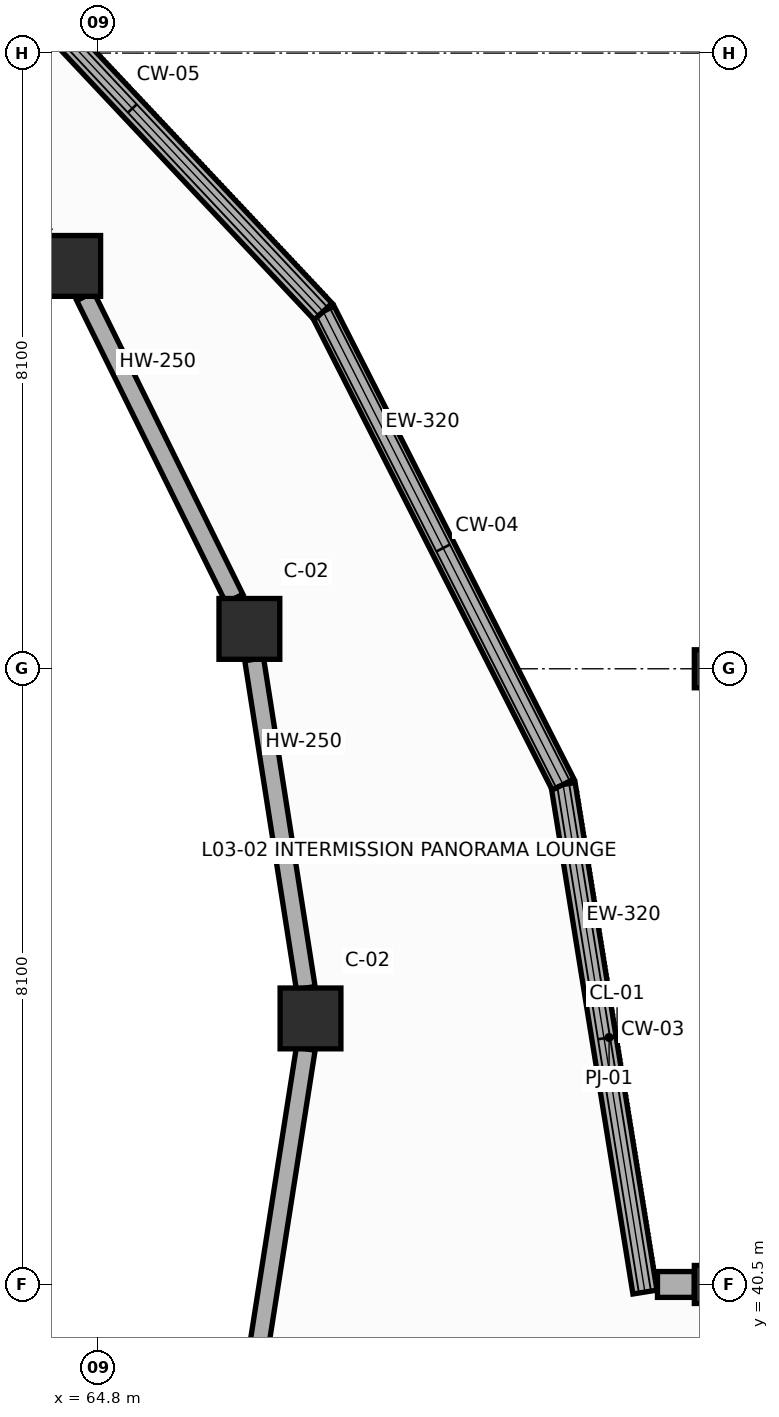
"""IFC4 building model, lengths in metres.
Left out: names, types, materials, properties, quantities, classifications, styles, units other than length and angle.
Written with IfcOpenShell. Run it as: python <this file> out.ifc"""

import sys

from ifc_helpers import new_model, si_unit, direction, frame, frame_2d, origin, origin_2d, place, context, subcontext, project, spatial, rectangle, extrude, element, save


model = new_model("IFC4")
c1 = context("Model", 3, precision=1e-05, world=origin(), true_north=direction((0.0, 1.0)))
c2 = subcontext(c1, "Body", "Model", "MODEL_VIEW")
j1 = project(units=[si_unit("LENGTHUNIT", "METRE"), si_unit("PLANEANGLEUNIT", "RADIAN")], contexts=[c1])
p1 = place(None, origin())
s1 = spatial("IfcSite", under=j1, at=p1, CompositionType="ELEMENT")
p2 = place(p1, origin())
s2 = spatial("IfcBuilding", under=s1, at=p2, CompositionType="ELEMENT")
p3 = place(p2, frame((0.0, 0.0, 15.0)))
s3 = spatial("IfcBuildingStorey", under=s2, at=p3, CompositionType="ELEMENT", Elevation=15.0)
for number, where, z_axis, x_axis in (
    (1, (67.6, 44.0, 0.0), (0.0, 0.0, 1.0), (1.0, 0.0, 0.0)),
    (2, (66.796, 49.125, 0.0), (0.0, 0.0, 1.0), (1.0, 0.0, 0.0)),
    (3, (64.438, 53.9, 0.0), (0.0, 0.0, 1.0), (1.0, 0.0, 0.0)),
):
    element("IfcColumn", number, at=place(p3, frame(where, z_axis=z_axis, x_axis=x_axis)), inside=s3, PredefinedType="COLUMN", context=c2, shape_type="SweptSolid", body=[
        extrude(rectangle(XDim=0.8, YDim=0.8, at=origin_2d()), origin(), (0.0, 0.0, 1.0), 4.2),
    ])
for number, where, z_axis, x_axis in (
    (4, (72.9, 40.5, 0.0), (0.0, 0.0, 1.0), (1.0, 0.0, 0.0)),
    (5, (72.9, 48.6, 0.0), (0.0, 0.0, 1.0), (1.0, 0.0, 0.0)),
):
    element("IfcColumn", number, at=place(p3, frame(where, z_axis=z_axis, x_axis=x_axis)), inside=s3, PredefinedType="COLUMN", context=c2, shape_type="SweptSolid", body=[
        extrude(rectangle(XDim=0.5, YDim=0.5, at=origin_2d()), origin(), (0.0, 0.0, 1.0), 4.2),
    ])
p4 = place(p3, frame((70.923, 47.077, 0.0), z_axis=(0.0, 0.0, 1.0), x_axis=(0.159181370366, -0.987249356206, 0.0)))
e6 = element("IfcWall", 6, at=p4, inside=s3, PredefinedType="SOLIDWALL", context=c2, shape_type="SweptSolid", body=[
    extrude(rectangle(XDim=6.764, YDim=0.32, at=frame_2d((3.382, 0.0))), origin(), (0.0, 0.0, 1.0), 1.2),
])
p5 = place(p3, frame((67.766, 53.3, 0.0), z_axis=(0.0, 0.0, 1.0), x_axis=(0.452440262938, -0.891794712068, 0.0)))
e7 = element("IfcWall", 7, at=p5, inside=s3, PredefinedType="SOLIDWALL", context=c2, shape_type="SweptSolid", body=[
    extrude(rectangle(XDim=6.978, YDim=0.32, at=frame_2d((3.489, 0.0))), origin(), (0.0, 0.0, 1.0), 1.2),
])
p6 = place(p3, frame((62.745, 58.643, 0.0), z_axis=(0.0, 0.0, 1.0), x_axis=(0.684842129235, -0.728691469708, 0.0)))
e8 = element("IfcWall", 8, at=p6, inside=s3, PredefinedType="SOLIDWALL", context=c2, shape_type="SweptSolid", body=[
    extrude(rectangle(XDim=7.333, YDim=0.32, at=frame_2d((3.667, 0.0))), origin(), (0.0, 0.0, 1.0), 1.2),
])
p7 = place(p3, frame((72.65, 40.5, 0.0), z_axis=(0.0, 0.0, 1.0), x_axis=(-1.0, 0.0, 0.0)))
e9 = element("IfcWall", 9, at=p7, inside=s3, PredefinedType="SOLIDWALL", context=c2, shape_type="SweptSolid", body=[
    extrude(rectangle(XDim=0.485, YDim=0.34, at=frame_2d((0.242, 0.0))), origin(), (0.0, 0.0, 1.0), 3.9),
])
p8 = place(p3, frame((66.859, 48.725, 0.0), z_axis=(0.0, 0.0, 1.0), x_axis=(0.154985912507, -0.987916680153, 0.0)))
e10 = element("IfcWall", 10, at=p8, inside=s3, PredefinedType="SOLIDWALL", context=c2, shape_type="SweptSolid", body=[
    extrude(rectangle(XDim=4.378, YDim=0.25, at=frame_2d((2.189, 0.0))), origin(), (0.0, 0.0, 1.0), 3.124),
])
p9 = place(p3, frame((64.636, 53.5, 0.0), z_axis=(0.0, 0.0, 1.0), x_axis=(0.442692313403, -0.896673583671, 0.0)))
e11 = element("IfcWall", 11, at=p9, inside=s3, PredefinedType="SOLIDWALL", context=c2, shape_type="SweptSolid", body=[
    extrude(rectangle(XDim=4.433, YDim=0.25, at=frame_2d((2.217, 0.0))), origin(), (0.0, 0.0, 1.0), 3.124),
])
p10 = place(p3, frame((67.537, 43.6, 0.0), z_axis=(0.0, 0.0, 1.0), x_axis=(-0.154985912507, -0.987916680153, 0.0)))
e12 = element("IfcWall", 12, at=p10, inside=s3, PredefinedType="SOLIDWALL", context=c2, shape_type="SweptSolid", body=[
    extrude(rectangle(XDim=4.378, YDim=0.25, at=frame_2d((2.189, 0.0))), origin(), (0.0, 0.0, 1.0), 3.124),
])
save(model, sys.argv[1])
